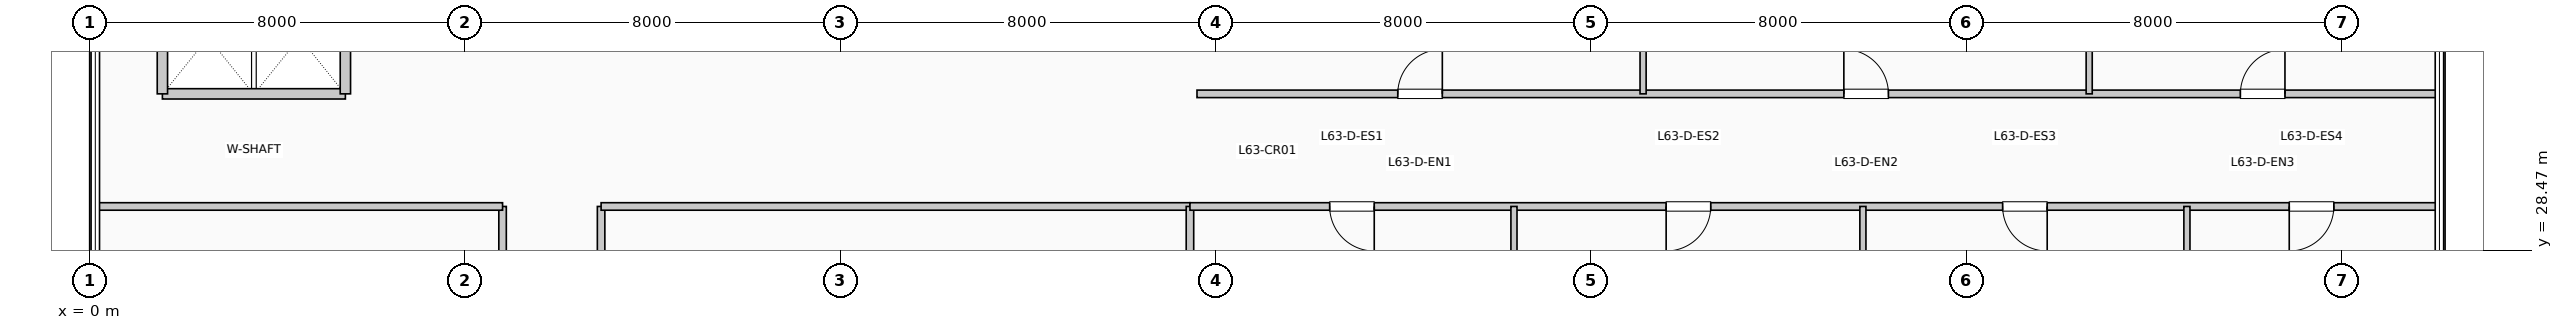
"""IFC4 building model, lengths in metres.
Left out: names, types, materials, properties, quantities, classifications, styles, units other than length and angle.
Written with IfcOpenShell. Run it as: python <this file> out.ifc"""

import sys

from ifc_helpers import new_model, si_unit, direction, frame, frame_2d, origin, place, context, subcontext, project, spatial, rectangle, extrude, element, fill, save


model = new_model("IFC4")
c1 = context("Model", 3, precision=1e-05, world=origin(), true_north=direction((0.0, 1.0)))
c2 = subcontext(c1, "Body", "Model", "MODEL_VIEW")
j1 = project(units=[si_unit("LENGTHUNIT", "METRE"), si_unit("PLANEANGLEUNIT", "RADIAN")], contexts=[c1])
p1 = place(None, origin())
s1 = spatial("IfcSite", under=j1, at=p1, CompositionType="ELEMENT")
p2 = place(p1, origin())
s2 = spatial("IfcBuilding", under=s1, at=p2, CompositionType="ELEMENT")
p3 = place(p2, frame((0.0, 0.0, 260.37)))
s3 = spatial("IfcBuildingStorey", under=s2, at=p3, CompositionType="ELEMENT", Elevation=260.37)
p4 = place(p3, frame((1.55, 31.8, 0.0), z_axis=(0.0, 0.0, 1.0), x_axis=(1.0, 0.0, 0.0)))
e1 = element("IfcWall", 1, at=p4, inside=s3, PredefinedType="PARTITIONING", context=c2, shape_type="SweptSolid", body=[
    extrude(rectangle(XDim=3.9, YDim=0.22, at=frame_2d((1.95, 0.0))), origin(), (0.0, 0.0, 1.0), 3.71),
])
for number, where, z_axis, x_axis in (
    (2, (1.55, 31.8, 0.0), (0.0, 0.0, 1.0), (0.0, 1.0, 0.0)),
    (3, (5.45, 31.8, 0.0), (0.0, 0.0, 1.0), (0.0, 1.0, 0.0)),
):
    element("IfcWall", number, at=place(p3, frame(where, z_axis=z_axis, x_axis=x_axis)), inside=s3, PredefinedType="PARTITIONING", context=c2, shape_type="SweptSolid", body=[
        extrude(rectangle(XDim=2.38, YDim=0.22, at=frame_2d((1.19, 0.0))), origin(), (0.0, 0.0, 1.0), 3.71),
    ])
p5 = place(p3, frame((8.8, 10.4, 0.0), z_axis=(0.0, 0.0, 1.0), x_axis=(0.0, 1.0, 0.0)))
e4 = element("IfcWall", 4, at=p5, inside=s3, PredefinedType="PARTITIONING", context=c2, shape_type="SweptSolid", body=[
    extrude(rectangle(XDim=19.0, YDim=0.16, at=frame_2d((9.5, 0.0))), origin(), (0.0, 0.0, 1.0), 3.71),
])
p6 = place(p5, frame((4.275, 0.0, 0.0), z_axis=(0.0, 0.0, 1.0), x_axis=(-1.0, 0.0, 0.0)))
e5 = element("IfcOpeningElement", 5, at=p6, cuts=e4, PredefinedType="OPENING", context=c2, shape_type="SweptSolid", body=[
    extrude(rectangle(XDim=0.95, YDim=2.15, at=frame_2d((0.475, 1.075))), frame((0.0, 0.09, 0.0), z_axis=(0.0, -1.0, 0.0), x_axis=(1.0, 0.0, 0.0)), (0.0, 0.0, 1.0), 0.18),
])
p7 = place(p5, frame((11.305, 0.0, 0.0), z_axis=(0.0, 0.0, 1.0), x_axis=(-1.0, 0.0, 0.0)))
e6 = element("IfcOpeningElement", 6, at=p7, cuts=e4, PredefinedType="OPENING", context=c2, shape_type="SweptSolid", body=[
    extrude(rectangle(XDim=0.95, YDim=2.15, at=frame_2d((0.475, 1.075))), frame((0.0, 0.09, 0.0), z_axis=(0.0, -1.0, 0.0), x_axis=(1.0, 0.0, 0.0)), (0.0, 0.0, 1.0), 0.18),
])
p8 = place(p5, frame((17.005, 0.0, 0.0), z_axis=(0.0, 0.0, 1.0), x_axis=(-1.0, 0.0, 0.0)))
e7 = element("IfcOpeningElement", 7, at=p8, cuts=e4, PredefinedType="OPENING", context=c2, shape_type="SweptSolid", body=[
    extrude(rectangle(XDim=0.95, YDim=2.15, at=frame_2d((0.475, 1.075))), frame((0.0, 0.09, 0.0), z_axis=(0.0, -1.0, 0.0), x_axis=(1.0, 0.0, 0.0)), (0.0, 0.0, 1.0), 0.18),
])
p9 = place(p3, frame((10.9, 10.4, 0.0), z_axis=(0.0, 0.0, 1.0), x_axis=(0.0, 1.0, 0.0)))
e8 = element("IfcWall", 8, at=p9, inside=s3, PredefinedType="PARTITIONING", context=c2, shape_type="SweptSolid", body=[
    extrude(rectangle(XDim=19.0, YDim=0.16, at=frame_2d((9.5, 0.0))), origin(), (0.0, 0.0, 1.0), 3.71),
])
p10 = place(p9, frame((2.995, 0.0, 0.0)))
e9 = element("IfcOpeningElement", 9, at=p10, cuts=e8, PredefinedType="OPENING", context=c2, shape_type="SweptSolid", body=[
    extrude(rectangle(XDim=0.95, YDim=2.15, at=frame_2d((0.475, 1.075))), frame((0.0, 0.09, 0.0), z_axis=(0.0, -1.0, 0.0), x_axis=(1.0, 0.0, 0.0)), (0.0, 0.0, 1.0), 0.18),
])
p11 = place(p9, frame((6.505, 0.0, 0.0)))
e10 = element("IfcOpeningElement", 10, at=p11, cuts=e8, PredefinedType="OPENING", context=c2, shape_type="SweptSolid", body=[
    extrude(rectangle(XDim=0.95, YDim=2.15, at=frame_2d((0.475, 1.075))), frame((0.0, 0.09, 0.0), z_axis=(0.0, -1.0, 0.0), x_axis=(1.0, 0.0, 0.0)), (0.0, 0.0, 1.0), 0.18),
])
p12 = place(p9, frame((14.535, 0.0, 0.0)))
e11 = element("IfcOpeningElement", 11, at=p12, cuts=e8, PredefinedType="OPENING", context=c2, shape_type="SweptSolid", body=[
    extrude(rectangle(XDim=0.95, YDim=2.15, at=frame_2d((0.475, 1.075))), frame((0.0, 0.09, 0.0), z_axis=(0.0, -1.0, 0.0), x_axis=(1.0, 0.0, 0.0)), (0.0, 0.0, 1.0), 0.18),
])
p13 = place(p3, frame((0.19, 29.4, 0.0), z_axis=(0.0, 0.0, 1.0), x_axis=(1.0, 0.0, 0.0)))
e12 = element("IfcWall", 12, at=p13, inside=s3, PredefinedType="PARTITIONING", context=c2, shape_type="SweptSolid", body=[
    extrude(rectangle(XDim=8.61, YDim=0.16, at=frame_2d((4.305, 0.0))), origin(), (0.0, 0.0, 1.0), 3.365),
])
p14 = place(p3, frame((10.9, 29.4, 0.0), z_axis=(0.0, 0.0, 1.0), x_axis=(1.0, 0.0, 0.0)))
e13 = element("IfcWall", 13, at=p14, inside=s3, PredefinedType="PARTITIONING", context=c2, shape_type="SweptSolid", body=[
    extrude(rectangle(XDim=12.55, YDim=0.16, at=frame_2d((6.275, 0.0))), origin(), (0.0, 0.0, 1.0), 3.365),
])
p15 = place(p3, frame((23.45, 5.99, 0.0), z_axis=(0.0, 0.0, 1.0), x_axis=(0.0, 1.0, 0.0)))
e14 = element("IfcWall", 14, at=p15, inside=s3, PredefinedType="PARTITIONING", context=c2, shape_type="SweptSolid", body=[
    extrude(rectangle(XDim=23.41, YDim=0.16, at=frame_2d((11.705, 0.0))), origin(), (0.0, 0.0, 1.0), 3.095),
])
p16 = place(p3, frame((23.45, 29.4, 0.0), z_axis=(0.0, 0.0, 1.0), x_axis=(1.0, 0.0, 0.0)))
e15 = element("IfcWall", 15, at=p16, inside=s3, PredefinedType="PARTITIONING", context=c2, shape_type="SweptSolid", body=[
    extrude(rectangle(XDim=26.56, YDim=0.16, at=frame_2d((13.28, 0.0))), origin(), (0.0, 0.0, 1.0), 3.365),
])
p17 = place(p16, frame((3.928, 0.0, 0.0), z_axis=(0.0, 0.0, 1.0), x_axis=(-1.0, 0.0, 0.0)))
e16 = element("IfcOpeningElement", 16, at=p17, cuts=e15, PredefinedType="OPENING", context=c2, shape_type="SweptSolid", body=[
    extrude(rectangle(XDim=0.95, YDim=2.15, at=frame_2d((0.475, 1.075))), frame((0.0, 0.09, 0.0), z_axis=(0.0, -1.0, 0.0), x_axis=(1.0, 0.0, 0.0)), (0.0, 0.0, 1.0), 0.18),
])
p18 = place(p16, frame((11.099, 0.0, 0.0), z_axis=(0.0, 0.0, 1.0), x_axis=(-1.0, 0.0, 0.0)))
e17 = element("IfcOpeningElement", 17, at=p18, cuts=e15, PredefinedType="OPENING", context=c2, shape_type="SweptSolid", body=[
    extrude(rectangle(XDim=0.95, YDim=2.15, at=frame_2d((0.475, 1.075))), frame((0.0, 0.09, 0.0), z_axis=(0.0, -1.0, 0.0), x_axis=(1.0, 0.0, 0.0)), (0.0, 0.0, 1.0), 0.18),
])
p19 = place(p16, frame((18.27, 0.0, 0.0), z_axis=(0.0, 0.0, 1.0), x_axis=(-1.0, 0.0, 0.0)))
e18 = element("IfcOpeningElement", 18, at=p19, cuts=e15, PredefinedType="OPENING", context=c2, shape_type="SweptSolid", body=[
    extrude(rectangle(XDim=0.95, YDim=2.15, at=frame_2d((0.475, 1.075))), frame((0.0, 0.09, 0.0), z_axis=(0.0, -1.0, 0.0), x_axis=(1.0, 0.0, 0.0)), (0.0, 0.0, 1.0), 0.18),
])
p20 = place(p16, frame((24.379, 0.0, 0.0), z_axis=(0.0, 0.0, 1.0), x_axis=(-1.0, 0.0, 0.0)))
e19 = element("IfcOpeningElement", 19, at=p20, cuts=e15, PredefinedType="OPENING", context=c2, shape_type="SweptSolid", body=[
    extrude(rectangle(XDim=0.95, YDim=2.15, at=frame_2d((0.475, 1.075))), frame((0.0, 0.09, 0.0), z_axis=(0.0, -1.0, 0.0), x_axis=(1.0, 0.0, 0.0)), (0.0, 0.0, 1.0), 0.18),
])
p21 = place(p3, frame((23.6, 31.8, 0.0), z_axis=(0.0, 0.0, 1.0), x_axis=(1.0, 0.0, 0.0)))
e20 = element("IfcWall", 20, at=p21, inside=s3, PredefinedType="PARTITIONING", context=c2, shape_type="SweptSolid", body=[
    extrude(rectangle(XDim=26.41, YDim=0.16, at=frame_2d((13.205, 0.0))), origin(), (0.0, 0.0, 1.0), 3.71),
])
p22 = place(p21, frame((4.279, 0.0, 0.0)))
e21 = element("IfcOpeningElement", 21, at=p22, cuts=e20, PredefinedType="OPENING", context=c2, shape_type="SweptSolid", body=[
    extrude(rectangle(XDim=0.95, YDim=2.15, at=frame_2d((0.475, 1.075))), frame((0.0, 0.09, 0.0), z_axis=(0.0, -1.0, 0.0), x_axis=(1.0, 0.0, 0.0)), (0.0, 0.0, 1.0), 0.18),
])
p23 = place(p21, frame((13.786, 0.0, 0.0)))
e22 = element("IfcOpeningElement", 22, at=p23, cuts=e20, PredefinedType="OPENING", context=c2, shape_type="SweptSolid", body=[
    extrude(rectangle(XDim=0.95, YDim=2.15, at=frame_2d((0.475, 1.075))), frame((0.0, 0.09, 0.0), z_axis=(0.0, -1.0, 0.0), x_axis=(1.0, 0.0, 0.0)), (0.0, 0.0, 1.0), 0.18),
])
p24 = place(p21, frame((22.238, 0.0, 0.0)))
e23 = element("IfcOpeningElement", 23, at=p24, cuts=e20, PredefinedType="OPENING", context=c2, shape_type="SweptSolid", body=[
    extrude(rectangle(XDim=0.95, YDim=2.15, at=frame_2d((0.475, 1.075))), frame((0.0, 0.09, 0.0), z_axis=(0.0, -1.0, 0.0), x_axis=(1.0, 0.0, 0.0)), (0.0, 0.0, 1.0), 0.18),
])
for number, where, z_axis, x_axis in (
    (24, (30.356, 22.19, 0.0), (0.0, 0.0, 1.0), (0.0, 1.0, 0.0)),
    (25, (37.792, 22.19, 0.0), (0.0, 0.0, 1.0), (0.0, 1.0, 0.0)),
    (26, (44.698, 22.19, 0.0), (0.0, 0.0, 1.0), (0.0, 1.0, 0.0)),
):
    element("IfcWall", number, at=place(p3, frame(where, z_axis=z_axis, x_axis=x_axis)), inside=s3, PredefinedType="PARTITIONING", context=c2, shape_type="SweptSolid", body=[
        extrude(rectangle(XDim=7.21, YDim=0.13, at=frame_2d((3.605, 0.0))), origin(), (0.0, 0.0, 1.0), 3.71),
    ])
for number, where, z_axis, x_axis in (
    (27, (33.108, 31.8, 0.0), (0.0, 0.0, 1.0), (0.0, 1.0, 0.0)),
    (28, (42.615, 31.8, 0.0), (0.0, 0.0, 1.0), (0.0, 1.0, 0.0)),
):
    element("IfcWall", number, at=place(p3, frame(where, z_axis=z_axis, x_axis=x_axis)), inside=s3, PredefinedType="PARTITIONING", context=c2, shape_type="SweptSolid", body=[
        extrude(rectangle(XDim=14.01, YDim=0.13, at=frame_2d((7.005, 0.0))), origin(), (0.0, 0.0, 1.0), 3.71),
    ])
p25 = place(p17, origin())
e29 = element("IfcDoor", 29, at=p25, inside=s3, OperationType="SINGLE_SWING_RIGHT", PredefinedType="DOOR", context=c2, shape_type="SweptSolid", body=[
    extrude(rectangle(XDim=0.95, YDim=2.15, at=frame_2d((0.475, 1.075))), frame((0.0, 0.025, 0.0), z_axis=(0.0, -1.0, 0.0), x_axis=(1.0, 0.0, 0.0)), (0.0, 0.0, 1.0), 0.05),
])
fill(e16, e29)
p26 = place(p18, origin())
e30 = element("IfcDoor", 30, at=p26, inside=s3, OperationType="SINGLE_SWING_LEFT", PredefinedType="DOOR", context=c2, shape_type="SweptSolid", body=[
    extrude(rectangle(XDim=0.95, YDim=2.15, at=frame_2d((0.475, 1.075))), frame((0.0, 0.025, 0.0), z_axis=(0.0, -1.0, 0.0), x_axis=(1.0, 0.0, 0.0)), (0.0, 0.0, 1.0), 0.05),
])
fill(e17, e30)
p27 = place(p19, origin())
e31 = element("IfcDoor", 31, at=p27, inside=s3, OperationType="SINGLE_SWING_RIGHT", PredefinedType="DOOR", context=c2, shape_type="SweptSolid", body=[
    extrude(rectangle(XDim=0.95, YDim=2.15, at=frame_2d((0.475, 1.075))), frame((0.0, 0.025, 0.0), z_axis=(0.0, -1.0, 0.0), x_axis=(1.0, 0.0, 0.0)), (0.0, 0.0, 1.0), 0.05),
])
fill(e18, e31)
p28 = place(p20, origin())
e32 = element("IfcDoor", 32, at=p28, inside=s3, OperationType="SINGLE_SWING_LEFT", PredefinedType="DOOR", context=c2, shape_type="SweptSolid", body=[
    extrude(rectangle(XDim=0.95, YDim=2.15, at=frame_2d((0.475, 1.075))), frame((0.0, 0.025, 0.0), z_axis=(0.0, -1.0, 0.0), x_axis=(1.0, 0.0, 0.0)), (0.0, 0.0, 1.0), 0.05),
])
fill(e19, e32)
p29 = place(p22, origin())
e33 = element("IfcDoor", 33, at=p29, inside=s3, OperationType="SINGLE_SWING_RIGHT", PredefinedType="DOOR", context=c2, shape_type="SweptSolid", body=[
    extrude(rectangle(XDim=0.95, YDim=2.15, at=frame_2d((0.475, 1.075))), frame((0.0, 0.025, 0.0), z_axis=(0.0, -1.0, 0.0), x_axis=(1.0, 0.0, 0.0)), (0.0, 0.0, 1.0), 0.05),
])
fill(e21, e33)
p30 = place(p23, origin())
e34 = element("IfcDoor", 34, at=p30, inside=s3, OperationType="SINGLE_SWING_LEFT", PredefinedType="DOOR", context=c2, shape_type="SweptSolid", body=[
    extrude(rectangle(XDim=0.95, YDim=2.15, at=frame_2d((0.475, 1.075))), frame((0.0, 0.025, 0.0), z_axis=(0.0, -1.0, 0.0), x_axis=(1.0, 0.0, 0.0)), (0.0, 0.0, 1.0), 0.05),
])
fill(e22, e34)
p31 = place(p24, origin())
e35 = element("IfcDoor", 35, at=p31, inside=s3, OperationType="SINGLE_SWING_RIGHT", PredefinedType="DOOR", context=c2, shape_type="SweptSolid", body=[
    extrude(rectangle(XDim=0.95, YDim=2.15, at=frame_2d((0.475, 1.075))), frame((0.0, 0.025, 0.0), z_axis=(0.0, -1.0, 0.0), x_axis=(1.0, 0.0, 0.0)), (0.0, 0.0, 1.0), 0.05),
])
fill(e23, e35)
save(model, sys.argv[1])
